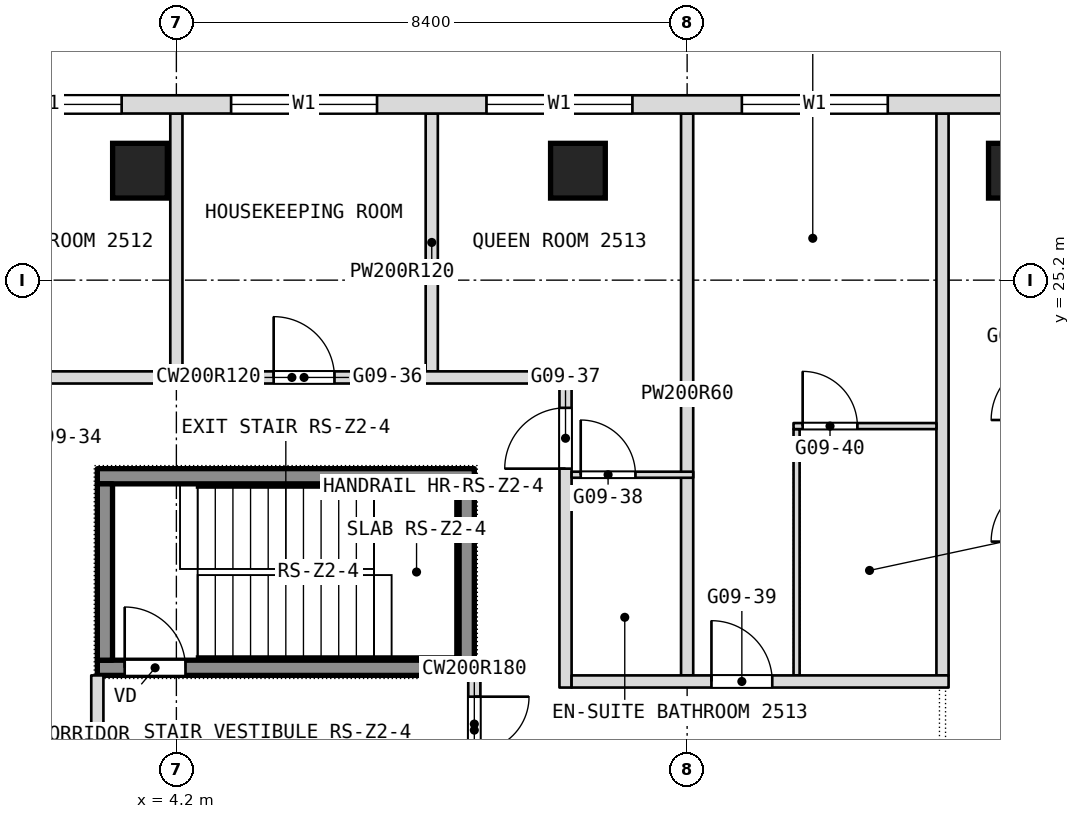
"""IFC4 building model, lengths in metres.
Left out: names, types, materials, properties, quantities, classifications, styles, units other than length and angle.
Written with IfcOpenShell. Run it as: python <this file> out.ifc"""

import sys

from ifc_helpers import new_model, si_unit, direction, frame, frame_2d, origin, origin_2d, place, context, subcontext, project, spatial, rectangle, extrude, element, fill, save


model = new_model("IFC4")
c1 = context("Model", 3, precision=1e-05, world=origin(), true_north=direction((0.0, 1.0)))
c2 = subcontext(c1, "Body", "Model", "MODEL_VIEW")
j1 = project(units=[si_unit("LENGTHUNIT", "METRE"), si_unit("PLANEANGLEUNIT", "RADIAN")], contexts=[c1])
p1 = place(None, origin())
s1 = spatial("IfcSite", under=j1, at=p1, CompositionType="ELEMENT")
p2 = place(p1, origin())
s2 = spatial("IfcBuilding", under=s1, at=p2, CompositionType="ELEMENT")
p3 = place(p2, frame((0.0, 0.0, 115.7)))
s3 = spatial("IfcBuildingStorey", under=s2, at=p3, CompositionType="ELEMENT", Elevation=115.7)
for number, where, z_axis, x_axis in (
    (1, (3.601, 27.0, 0.0), (0.0, 0.0, 1.0), (1.0, 0.0, 0.0)),
    (2, (10.804, 27.0, 0.0), (0.0, 0.0, 1.0), (1.0, 0.0, 0.0)),
    (3, (18.007, 27.0, 0.0), (0.0, 0.0, 1.0), (1.0, 0.0, 0.0)),
):
    element("IfcColumn", number, at=place(p3, frame(where, z_axis=z_axis, x_axis=x_axis)), inside=s3, PredefinedType="COLUMN", context=c2, shape_type="SweptSolid", body=[
        extrude(rectangle(XDim=0.9, YDim=0.9, at=origin_2d()), origin(), (0.0, 0.0, 1.0), 3.6),
    ])
p4 = place(p3, frame((16.8, 18.7, 0.0), z_axis=(0.0, 0.0, 1.0), x_axis=(0.0, 1.0, 0.0)))
e4 = element("IfcWall", 4, at=p4, inside=s3, PredefinedType="PARTITIONING", context=c2, shape_type="SweptSolid", body=[
    extrude(rectangle(XDim=9.24, YDim=0.2, at=frame_2d((4.62, 0.0))), origin(), (0.0, 0.0, 1.0), 3.34),
])
p5 = place(p3, frame((14.4, 18.7, 0.0), z_axis=(0.0, 0.0, 1.0), x_axis=(0.0, 1.0, 0.0)))
e5 = element("IfcWall", 5, at=p5, inside=s3, PredefinedType="PARTITIONING", context=c2, shape_type="SweptSolid", body=[
    extrude(rectangle(XDim=4.05, YDim=0.1, at=frame_2d((2.025, 0.0))), origin(), (0.0, 0.0, 1.0), 3.34),
])
p6 = place(p3, frame((12.6, 18.7, 0.0), z_axis=(0.0, 0.0, 1.0), x_axis=(0.0, 1.0, 0.0)))
e6 = element("IfcWall", 6, at=p6, inside=s3, PredefinedType="PARTITIONING", context=c2, shape_type="SweptSolid", body=[
    extrude(rectangle(XDim=9.24, YDim=0.2, at=frame_2d((4.62, 0.0))), origin(), (0.0, 0.0, 1.0), 3.34),
])
p7 = place(p3, frame((10.6, 18.5, 0.0), z_axis=(0.0, 0.0, 1.0), x_axis=(0.0, 1.0, 0.0)))
e7 = element("IfcWall", 7, at=p7, inside=s3, PredefinedType="PARTITIONING", context=c2, shape_type="SweptSolid", body=[
    extrude(rectangle(XDim=5.0, YDim=0.2, at=frame_2d((2.5, 0.0))), origin(), (0.0, 0.0, 1.0), 3.34),
])
p8 = place(p7, frame((3.6, 0.0, 0.0)))
e8 = element("IfcOpeningElement", 8, at=p8, cuts=e7, PredefinedType="OPENING", context=c2, shape_type="SweptSolid", body=[
    extrude(rectangle(XDim=1.0, YDim=2.1, at=frame_2d((0.5, 1.05))), frame((0.0, 0.1, 0.0), z_axis=(0.0, -1.0, 0.0), x_axis=(1.0, 0.0, 0.0)), (0.0, 0.0, 1.0), 0.2),
])
p9 = place(p3, frame((9.1, 16.9, 0.0), z_axis=(0.0, 0.0, 1.0), x_axis=(0.0, 1.0, 0.0)))
e9 = element("IfcWall", 9, at=p9, inside=s3, PredefinedType="PARTITIONING", context=c2, shape_type="SweptSolid", body=[
    extrude(rectangle(XDim=1.8, YDim=0.2, at=frame_2d((0.9, 0.0))), origin(), (0.0, 0.0, 1.0), 3.34),
])
p10 = place(p9, frame((0.55, 0.0, 0.0)))
e10 = element("IfcOpeningElement", 10, at=p10, cuts=e9, PredefinedType="OPENING", context=c2, shape_type="SweptSolid", body=[
    extrude(rectangle(XDim=0.9, YDim=2.1, at=frame_2d((0.45, 1.05))), frame((0.0, 0.1, 0.0), z_axis=(0.0, -1.0, 0.0), x_axis=(1.0, 0.0, 0.0)), (0.0, 0.0, 1.0), 0.2),
])
for number, where, z_axis, x_axis in (
    (11, (8.4, 23.7, 0.0), (0.0, 0.0, 1.0), (0.0, 1.0, 0.0)),
    (12, (4.2, 23.7, 0.0), (0.0, 0.0, 1.0), (0.0, 1.0, 0.0)),
):
    element("IfcWall", number, at=place(p3, frame(where, z_axis=z_axis, x_axis=x_axis)), inside=s3, PredefinedType="PARTITIONING", context=c2, shape_type="SweptSolid", body=[
        extrude(rectangle(XDim=4.24, YDim=0.2, at=frame_2d((2.12, 0.0))), origin(), (0.0, 0.0, 1.0), 3.34),
    ])
p11 = place(p3, frame((2.9, 16.9, 0.0), z_axis=(0.0, 0.0, 1.0), x_axis=(0.0, 1.0, 0.0)))
e13 = element("IfcWall", 13, at=p11, inside=s3, PredefinedType="PARTITIONING", context=c2, shape_type="SweptSolid", body=[
    extrude(rectangle(XDim=1.8, YDim=0.2, at=frame_2d((0.9, 0.0))), origin(), (0.0, 0.0, 1.0), 3.34),
])
p12 = place(p3, frame((10.7, 18.6, 0.0), z_axis=(0.0, 0.0, 1.0), x_axis=(1.0, 0.0, 0.0)))
e14 = element("IfcWall", 14, at=p12, inside=s3, PredefinedType="PARTITIONING", context=c2, shape_type="SweptSolid", body=[
    extrude(rectangle(XDim=6.2, YDim=0.2, at=frame_2d((3.1, 0.0))), origin(), (0.0, 0.0, 1.0), 3.34),
])
p13 = place(p12, frame((2.3, 0.0, 0.0)))
e15 = element("IfcOpeningElement", 15, at=p13, cuts=e14, PredefinedType="OPENING", context=c2, shape_type="SweptSolid", body=[
    extrude(rectangle(XDim=1.0, YDim=2.1, at=frame_2d((0.5, 1.05))), frame((0.0, 0.1, 0.0), z_axis=(0.0, -1.0, 0.0), x_axis=(1.0, 0.0, 0.0)), (0.0, 0.0, 1.0), 0.2),
])
p14 = place(p3, frame((10.7, 22.0, 0.0), z_axis=(0.0, 0.0, 1.0), x_axis=(1.0, 0.0, 0.0)))
e16 = element("IfcWall", 16, at=p14, inside=s3, PredefinedType="PARTITIONING", context=c2, shape_type="SweptSolid", body=[
    extrude(rectangle(XDim=2.0, YDim=0.1, at=frame_2d((1.0, 0.0))), origin(), (0.0, 0.0, 1.0), 3.34),
])
p15 = place(p14, frame((0.15, 0.0, 0.0)))
e17 = element("IfcOpeningElement", 17, at=p15, cuts=e16, PredefinedType="OPENING", context=c2, shape_type="SweptSolid", body=[
    extrude(rectangle(XDim=0.9, YDim=2.1, at=frame_2d((0.45, 1.05))), frame((0.0, 0.05, 0.0), z_axis=(0.0, -1.0, 0.0), x_axis=(1.0, 0.0, 0.0)), (0.0, 0.0, 1.0), 0.1),
])
p16 = place(p3, frame((14.35, 22.8, 0.0), z_axis=(0.0, 0.0, 1.0), x_axis=(1.0, 0.0, 0.0)))
e18 = element("IfcWall", 18, at=p16, inside=s3, PredefinedType="PARTITIONING", context=c2, shape_type="SweptSolid", body=[
    extrude(rectangle(XDim=2.35, YDim=0.1, at=frame_2d((1.175, 0.0))), origin(), (0.0, 0.0, 1.0), 3.34),
])
p17 = place(p16, frame((0.15, 0.0, 0.0)))
e19 = element("IfcOpeningElement", 19, at=p17, cuts=e18, PredefinedType="OPENING", context=c2, shape_type="SweptSolid", body=[
    extrude(rectangle(XDim=0.9, YDim=2.1, at=frame_2d((0.45, 1.05))), frame((0.0, 0.05, 0.0), z_axis=(0.0, -1.0, 0.0), x_axis=(1.0, 0.0, 0.0)), (0.0, 0.0, 1.0), 0.1),
])
p18 = place(p3, frame((1.5, 23.6, 0.0), z_axis=(0.0, 0.0, 1.0), x_axis=(1.0, 0.0, 0.0)))
e20 = element("IfcWall", 20, at=p18, inside=s3, PredefinedType="PARTITIONING", context=c2, shape_type="SweptSolid", body=[
    extrude(rectangle(XDim=9.2, YDim=0.2, at=frame_2d((4.6, 0.0))), origin(), (0.0, 0.0, 1.0), 3.34),
])
p19 = place(p18, frame((4.3, 0.0, 0.0)))
e21 = element("IfcOpeningElement", 21, at=p19, cuts=e20, PredefinedType="OPENING", context=c2, shape_type="SweptSolid", body=[
    extrude(rectangle(XDim=1.0, YDim=2.1, at=frame_2d((0.5, 1.05))), frame((0.0, 0.1, 0.0), z_axis=(0.0, -1.0, 0.0), x_axis=(1.0, 0.0, 0.0)), (0.0, 0.0, 1.0), 0.2),
])
p20 = place(p3, frame((21.306, 28.09, 0.0), z_axis=(0.0, 0.0, 1.0), x_axis=(-1.0, 0.0, 0.0)))
e22 = element("IfcWall", 22, at=p20, inside=s3, PredefinedType="NOTDEFINED", context=c2, shape_type="SweptSolid", body=[
    extrude(rectangle(XDim=42.612, YDim=0.3, at=frame_2d((21.306, 0.0))), origin(), (0.0, 0.0, 1.0), 3.6),
])
p21 = place(p20, frame((5.406, 0.0, 0.9)))
e23 = element("IfcOpeningElement", 23, at=p21, cuts=e22, PredefinedType="OPENING", context=c2, shape_type="SweptSolid", body=[
    extrude(rectangle(XDim=2.4, YDim=2.1, at=frame_2d((1.2, 1.05))), frame((0.0, 0.15, 0.0), z_axis=(0.0, -1.0, 0.0), x_axis=(1.0, 0.0, 0.0)), (0.0, 0.0, 1.0), 0.3),
])
p22 = place(p20, frame((9.606, 0.0, 0.9)))
e24 = element("IfcOpeningElement", 24, at=p22, cuts=e22, PredefinedType="OPENING", context=c2, shape_type="SweptSolid", body=[
    extrude(rectangle(XDim=2.4, YDim=2.1, at=frame_2d((1.2, 1.05))), frame((0.0, 0.15, 0.0), z_axis=(0.0, -1.0, 0.0), x_axis=(1.0, 0.0, 0.0)), (0.0, 0.0, 1.0), 0.3),
])
p23 = place(p20, frame((13.806, 0.0, 0.9)))
e25 = element("IfcOpeningElement", 25, at=p23, cuts=e22, PredefinedType="OPENING", context=c2, shape_type="SweptSolid", body=[
    extrude(rectangle(XDim=2.4, YDim=2.1, at=frame_2d((1.2, 1.05))), frame((0.0, 0.15, 0.0), z_axis=(0.0, -1.0, 0.0), x_axis=(1.0, 0.0, 0.0)), (0.0, 0.0, 1.0), 0.3),
])
p24 = place(p20, frame((18.006, 0.0, 0.9)))
e26 = element("IfcOpeningElement", 26, at=p24, cuts=e22, PredefinedType="OPENING", context=c2, shape_type="SweptSolid", body=[
    extrude(rectangle(XDim=2.4, YDim=2.1, at=frame_2d((1.2, 1.05))), frame((0.0, 0.15, 0.0), z_axis=(0.0, -1.0, 0.0), x_axis=(1.0, 0.0, 0.0)), (0.0, 0.0, 1.0), 0.3),
])
p25 = place(p20, frame((22.206, 0.0, 0.9)))
e27 = element("IfcOpeningElement", 27, at=p25, cuts=e22, PredefinedType="OPENING", context=c2, shape_type="SweptSolid", body=[
    extrude(rectangle(XDim=2.4, YDim=2.1, at=frame_2d((1.2, 1.05))), frame((0.0, 0.15, 0.0), z_axis=(0.0, -1.0, 0.0), x_axis=(1.0, 0.0, 0.0)), (0.0, 0.0, 1.0), 0.3),
])
p26 = place(p20, frame((26.406, 0.0, 0.9)))
e28 = element("IfcOpeningElement", 28, at=p26, cuts=e22, PredefinedType="OPENING", context=c2, shape_type="SweptSolid", body=[
    extrude(rectangle(XDim=2.4, YDim=2.1, at=frame_2d((1.2, 1.05))), frame((0.0, 0.15, 0.0), z_axis=(0.0, -1.0, 0.0), x_axis=(1.0, 0.0, 0.0)), (0.0, 0.0, 1.0), 0.3),
])
p27 = place(p20, frame((30.606, 0.0, 0.9)))
e29 = element("IfcOpeningElement", 29, at=p27, cuts=e22, PredefinedType="OPENING", context=c2, shape_type="SweptSolid", body=[
    extrude(rectangle(XDim=2.4, YDim=2.1, at=frame_2d((1.2, 1.05))), frame((0.0, 0.15, 0.0), z_axis=(0.0, -1.0, 0.0), x_axis=(1.0, 0.0, 0.0)), (0.0, 0.0, 1.0), 0.3),
])
p28 = place(p20, frame((34.806, 0.0, 0.9)))
e30 = element("IfcOpeningElement", 30, at=p28, cuts=e22, PredefinedType="OPENING", context=c2, shape_type="SweptSolid", body=[
    extrude(rectangle(XDim=2.4, YDim=2.1, at=frame_2d((1.2, 1.05))), frame((0.0, 0.15, 0.0), z_axis=(0.0, -1.0, 0.0), x_axis=(1.0, 0.0, 0.0)), (0.0, 0.0, 1.0), 0.3),
])
p29 = place(p3, frame((2.9, 18.825, 0.1), z_axis=(0.0, 0.0, 1.0), x_axis=(1.0, 0.0, 0.0)))
e31 = element("IfcWall", 31, at=p29, inside=s3, PredefinedType="SHEAR", context=c2, shape_type="SweptSolid", body=[
    extrude(rectangle(XDim=6.2, YDim=0.25, at=frame_2d((3.1, 0.0))), origin(), (0.0, 0.0, 1.0), 3.6),
])
p30 = place(p29, frame((0.45, 0.0, 0.0)))
e32 = element("IfcOpeningElement", 32, at=p30, cuts=e31, PredefinedType="OPENING", context=c2, shape_type="SweptSolid", body=[
    extrude(rectangle(XDim=1.0, YDim=2.1, at=frame_2d((0.5, 1.05))), frame((0.0, 0.125, 0.0), z_axis=(0.0, -1.0, 0.0), x_axis=(1.0, 0.0, 0.0)), (0.0, 0.0, 1.0), 0.25),
])
p31 = place(p3, frame((2.9, 21.975, 0.1), z_axis=(0.0, 0.0, 1.0), x_axis=(1.0, 0.0, 0.0)))
e33 = element("IfcWall", 33, at=p31, inside=s3, PredefinedType="SHEAR", context=c2, shape_type="SweptSolid", body=[
    extrude(rectangle(XDim=6.2, YDim=0.25, at=frame_2d((3.1, 0.0))), origin(), (0.0, 0.0, 1.0), 3.6),
])
for number, where, z_axis, x_axis in (
    (34, (3.025, 18.95, 0.1), (0.0, 0.0, 1.0), (0.0, 1.0, 0.0)),
    (35, (8.975, 18.95, 0.1), (0.0, 0.0, 1.0), (0.0, 1.0, 0.0)),
):
    element("IfcWall", number, at=place(p3, frame(where, z_axis=z_axis, x_axis=x_axis)), inside=s3, PredefinedType="SHEAR", context=c2, shape_type="SweptSolid", body=[
        extrude(rectangle(XDim=2.9, YDim=0.25, at=frame_2d((1.45, 0.0))), origin(), (0.0, 0.0, 1.0), 3.6),
    ])
p32 = place(p8, origin())
e36 = element("IfcDoor", 36, at=p32, inside=s3, OperationType="SINGLE_SWING_LEFT", PredefinedType="DOOR", context=c2, shape_type="SweptSolid", body=[
    extrude(rectangle(XDim=1.0, YDim=2.1, at=frame_2d((0.5, 1.05))), frame((0.0, 0.025, 0.0), z_axis=(0.0, -1.0, 0.0), x_axis=(1.0, 0.0, 0.0)), (0.0, 0.0, 1.0), 0.05),
])
fill(e8, e36)
p33 = place(p10, origin())
e37 = element("IfcDoor", 37, at=p33, inside=s3, OperationType="SINGLE_SWING_RIGHT", PredefinedType="DOOR", context=c2, shape_type="SweptSolid", body=[
    extrude(rectangle(XDim=0.9, YDim=2.1, at=frame_2d((0.45, 1.05))), frame((0.0, 0.025, 0.0), z_axis=(0.0, -1.0, 0.0), x_axis=(1.0, 0.0, 0.0)), (0.0, 0.0, 1.0), 0.05),
])
fill(e10, e37)
p34 = place(p13, origin())
e38 = element("IfcDoor", 38, at=p34, inside=s3, OperationType="SINGLE_SWING_RIGHT", PredefinedType="DOOR", context=c2, shape_type="SweptSolid", body=[
    extrude(rectangle(XDim=1.0, YDim=2.1, at=frame_2d((0.5, 1.05))), frame((0.0, 0.025, 0.0), z_axis=(0.0, -1.0, 0.0), x_axis=(1.0, 0.0, 0.0)), (0.0, 0.0, 1.0), 0.05),
])
fill(e15, e38)
p35 = place(p15, origin())
e39 = element("IfcDoor", 39, at=p35, inside=s3, OperationType="SINGLE_SWING_RIGHT", PredefinedType="DOOR", context=c2, shape_type="SweptSolid", body=[
    extrude(rectangle(XDim=0.9, YDim=2.1, at=frame_2d((0.45, 1.05))), frame((0.0, 0.025, 0.0), z_axis=(0.0, -1.0, 0.0), x_axis=(1.0, 0.0, 0.0)), (0.0, 0.0, 1.0), 0.05),
])
fill(e17, e39)
p36 = place(p17, origin())
e40 = element("IfcDoor", 40, at=p36, inside=s3, OperationType="SINGLE_SWING_RIGHT", PredefinedType="DOOR", context=c2, shape_type="SweptSolid", body=[
    extrude(rectangle(XDim=0.9, YDim=2.1, at=frame_2d((0.45, 1.05))), frame((0.0, 0.025, 0.0), z_axis=(0.0, -1.0, 0.0), x_axis=(1.0, 0.0, 0.0)), (0.0, 0.0, 1.0), 0.05),
])
fill(e19, e40)
p37 = place(p19, origin())
e41 = element("IfcDoor", 41, at=p37, inside=s3, OperationType="SINGLE_SWING_LEFT", PredefinedType="DOOR", context=c2, shape_type="SweptSolid", body=[
    extrude(rectangle(XDim=1.0, YDim=2.1, at=frame_2d((0.5, 1.05))), frame((0.0, 0.025, 0.0), z_axis=(0.0, -1.0, 0.0), x_axis=(1.0, 0.0, 0.0)), (0.0, 0.0, 1.0), 0.05),
])
fill(e21, e41)
p38 = place(p21, origin())
e42 = element("IfcWindow", 42, at=p38, inside=s3, PartitioningType="SINGLE_PANEL", PredefinedType="WINDOW", context=c2, shape_type="SweptSolid", body=[
    extrude(rectangle(XDim=2.4, YDim=2.1, at=frame_2d((1.2, 1.05))), frame((0.0, 0.03, 0.0), z_axis=(0.0, -1.0, 0.0), x_axis=(1.0, 0.0, 0.0)), (0.0, 0.0, 1.0), 0.06),
])
fill(e23, e42)
p39 = place(p22, origin())
e43 = element("IfcWindow", 43, at=p39, inside=s3, PartitioningType="SINGLE_PANEL", PredefinedType="WINDOW", context=c2, shape_type="SweptSolid", body=[
    extrude(rectangle(XDim=2.4, YDim=2.1, at=frame_2d((1.2, 1.05))), frame((0.0, 0.03, 0.0), z_axis=(0.0, -1.0, 0.0), x_axis=(1.0, 0.0, 0.0)), (0.0, 0.0, 1.0), 0.06),
])
fill(e24, e43)
p40 = place(p23, origin())
e44 = element("IfcWindow", 44, at=p40, inside=s3, PartitioningType="SINGLE_PANEL", PredefinedType="WINDOW", context=c2, shape_type="SweptSolid", body=[
    extrude(rectangle(XDim=2.4, YDim=2.1, at=frame_2d((1.2, 1.05))), frame((0.0, 0.03, 0.0), z_axis=(0.0, -1.0, 0.0), x_axis=(1.0, 0.0, 0.0)), (0.0, 0.0, 1.0), 0.06),
])
fill(e25, e44)
p41 = place(p24, origin())
e45 = element("IfcWindow", 45, at=p41, inside=s3, PartitioningType="SINGLE_PANEL", PredefinedType="WINDOW", context=c2, shape_type="SweptSolid", body=[
    extrude(rectangle(XDim=2.4, YDim=2.1, at=frame_2d((1.2, 1.05))), frame((0.0, 0.03, 0.0), z_axis=(0.0, -1.0, 0.0), x_axis=(1.0, 0.0, 0.0)), (0.0, 0.0, 1.0), 0.06),
])
fill(e26, e45)
p42 = place(p30, origin())
e46 = element("IfcDoor", 46, at=p42, inside=s3, OperationType="SINGLE_SWING_LEFT", PredefinedType="DOOR", context=c2, shape_type="SweptSolid", body=[
    extrude(rectangle(XDim=1.0, YDim=2.1, at=frame_2d((0.5, 1.05))), frame((0.0, 0.025, 0.0), z_axis=(0.0, -1.0, 0.0), x_axis=(1.0, 0.0, 0.0)), (0.0, 0.0, 1.0), 0.05),
])
fill(e32, e46)
save(model, sys.argv[1])
